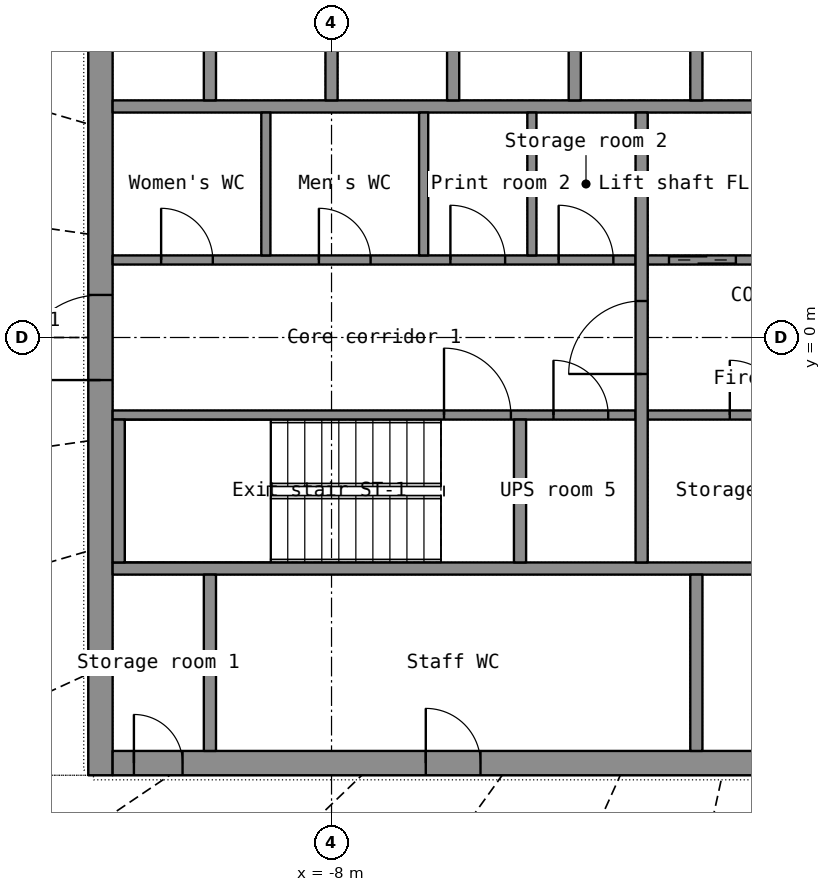
"""IFC4 building model, lengths in metres.
Left out: names, types, materials, properties, quantities, classifications, styles, units other than length and angle.
Written with IfcOpenShell. Run it as: python <this file> out.ifc"""

import sys

from ifc_helpers import new_model, si_unit, direction, frame, frame_2d, origin, place, context, subcontext, project, spatial, rectangle, extrude, element, fill, save


model = new_model("IFC4")
c1 = context("Model", 3, precision=1e-05, world=origin(), true_north=direction((0.0, 1.0)))
c2 = subcontext(c1, "Body", "Model", "MODEL_VIEW")
j1 = project(units=[si_unit("LENGTHUNIT", "METRE"), si_unit("PLANEANGLEUNIT", "RADIAN")], contexts=[c1])
p1 = place(None, origin())
s1 = spatial("IfcSite", under=j1, at=p1, CompositionType="ELEMENT")
p2 = place(p1, origin())
s2 = spatial("IfcBuilding", under=s1, at=p2, CompositionType="ELEMENT")
p3 = place(p2, frame((0.0, 0.0, 239.3)))
s3 = spatial("IfcBuildingStorey", under=s2, at=p3, CompositionType="ELEMENT", Elevation=239.3)
p4 = place(p3, frame((-11.8, -7.2, 0.0), z_axis=(0.0, 0.0, 1.0), x_axis=(0.0, 1.0, 0.0)))
e1 = element("IfcWall", 1, at=p4, inside=s3, PredefinedType="SHEAR", context=c2, shape_type="SweptSolid", body=[
    extrude(rectangle(XDim=14.4, YDim=0.4, at=frame_2d((7.2, 0.0))), origin(), (0.0, 0.0, 1.0), 3.3),
])
p5 = place(p4, frame((6.5, 0.0, 0.0)))
e2 = element("IfcOpeningElement", 2, at=p5, cuts=e1, PredefinedType="OPENING", context=c2, shape_type="SweptSolid", body=[
    extrude(rectangle(XDim=1.4, YDim=2.2, at=frame_2d((0.7, 1.1))), frame((0.0, 0.21, 0.0), z_axis=(0.0, -1.0, 0.0), x_axis=(1.0, 0.0, 0.0)), (0.0, 0.0, 1.0), 0.42),
])
p6 = place(p3, frame((-11.6, -7.0, 0.0), z_axis=(0.0, 0.0, 1.0), x_axis=(1.0, 0.0, 0.0)))
e3 = element("IfcWall", 3, at=p6, inside=s3, PredefinedType="SHEAR", context=c2, shape_type="SweptSolid", body=[
    extrude(rectangle(XDim=23.2, YDim=0.4, at=frame_2d((11.6, 0.0))), origin(), (0.0, 0.0, 1.0), 3.3),
])
p7 = place(p6, frame((20.05, 0.0, 0.0)))
e4 = element("IfcOpeningElement", 4, at=p7, cuts=e3, PredefinedType="OPENING", context=c2, shape_type="SweptSolid", body=[
    extrude(rectangle(XDim=1.1, YDim=2.2, at=frame_2d((0.55, 1.1))), frame((0.0, 0.21, 0.0), z_axis=(0.0, -1.0, 0.0), x_axis=(1.0, 0.0, 0.0)), (0.0, 0.0, 1.0), 0.42),
])
p8 = place(p6, frame((5.15, 0.0, 0.0)))
e5 = element("IfcOpeningElement", 5, at=p8, cuts=e3, PredefinedType="OPENING", context=c2, shape_type="SweptSolid", body=[
    extrude(rectangle(XDim=0.9, YDim=2.1, at=frame_2d((0.45, 1.05))), frame((0.0, 0.21, 0.0), z_axis=(0.0, -1.0, 0.0), x_axis=(1.0, 0.0, 0.0)), (0.0, 0.0, 1.0), 0.42),
])
p9 = place(p6, frame((11.15, 0.0, 0.0)))
e6 = element("IfcOpeningElement", 6, at=p9, cuts=e3, PredefinedType="OPENING", context=c2, shape_type="SweptSolid", body=[
    extrude(rectangle(XDim=0.9, YDim=2.1, at=frame_2d((0.45, 1.05))), frame((0.0, 0.21, 0.0), z_axis=(0.0, -1.0, 0.0), x_axis=(1.0, 0.0, 0.0)), (0.0, 0.0, 1.0), 0.42),
])
p10 = place(p6, frame((16.15, 0.0, 0.0)))
e7 = element("IfcOpeningElement", 7, at=p10, cuts=e3, PredefinedType="OPENING", context=c2, shape_type="SweptSolid", body=[
    extrude(rectangle(XDim=0.9, YDim=2.1, at=frame_2d((0.45, 1.05))), frame((0.0, 0.21, 0.0), z_axis=(0.0, -1.0, 0.0), x_axis=(1.0, 0.0, 0.0)), (0.0, 0.0, 1.0), 0.42),
])
p11 = place(p6, frame((0.35, 0.0, 0.0)))
e8 = element("IfcOpeningElement", 8, at=p11, cuts=e3, PredefinedType="OPENING", context=c2, shape_type="SweptSolid", body=[
    extrude(rectangle(XDim=0.8, YDim=2.05, at=frame_2d((0.4, 1.025))), frame((0.0, 0.21, 0.0), z_axis=(0.0, -1.0, 0.0), x_axis=(1.0, 0.0, 0.0)), (0.0, 0.0, 1.0), 0.42),
])
p12 = place(p6, frame((22.05, 0.0, 0.0)))
e9 = element("IfcOpeningElement", 9, at=p12, cuts=e3, PredefinedType="OPENING", context=c2, shape_type="SweptSolid", body=[
    extrude(rectangle(XDim=0.8, YDim=2.05, at=frame_2d((0.4, 1.025))), frame((0.0, 0.21, 0.0), z_axis=(0.0, -1.0, 0.0), x_axis=(1.0, 0.0, 0.0)), (0.0, 0.0, 1.0), 0.42),
])
for number, where, z_axis, x_axis in (
    (10, (-11.6, -3.8, 0.0), (0.0, 0.0, 1.0), (1.0, 0.0, 0.0)),
    (11, (-11.6, 3.8, 0.0), (0.0, 0.0, 1.0), (1.0, 0.0, 0.0)),
):
    element("IfcWall", number, at=place(p3, frame(where, z_axis=z_axis, x_axis=x_axis)), inside=s3, PredefinedType="SHEAR", context=c2, shape_type="SweptSolid", body=[
        extrude(rectangle(XDim=23.2, YDim=0.2, at=frame_2d((11.6, 0.0))), origin(), (0.0, 0.0, 1.0), 3.3),
    ])
p13 = place(p3, frame((-10.0, -6.8, 0.0), z_axis=(0.0, 0.0, 1.0), x_axis=(0.0, 1.0, 0.0)))
e12 = element("IfcWall", 12, at=p13, inside=s3, PredefinedType="SHEAR", context=c2, shape_type="SweptSolid", body=[
    extrude(rectangle(XDim=2.9, YDim=0.2, at=frame_2d((1.45, 0.0))), origin(), (0.0, 0.0, 1.0), 3.3),
])
p14 = place(p3, frame((-2.0, -6.8, 0.0), z_axis=(0.0, 0.0, 1.0), x_axis=(0.0, 1.0, 0.0)))
e13 = element("IfcWall", 13, at=p14, inside=s3, PredefinedType="PARTITIONING", context=c2, shape_type="SweptSolid", body=[
    extrude(rectangle(XDim=2.9, YDim=0.2, at=frame_2d((1.45, 0.0))), origin(), (0.0, 0.0, 1.0), 3.3),
])
for number, where, z_axis, x_axis in (
    (14, (-10.0, 3.9, 0.0), (0.0, 0.0, 1.0), (0.0, 1.0, 0.0)),
    (15, (-8.0, 3.9, 0.0), (0.0, 0.0, 1.0), (0.0, 1.0, 0.0)),
    (16, (-6.0, 3.9, 0.0), (0.0, 0.0, 1.0), (0.0, 1.0, 0.0)),
    (17, (-4.0, 3.9, 0.0), (0.0, 0.0, 1.0), (0.0, 1.0, 0.0)),
    (18, (-2.0, 3.9, 0.0), (0.0, 0.0, 1.0), (0.0, 1.0, 0.0)),
):
    element("IfcWall", number, at=place(p3, frame(where, z_axis=z_axis, x_axis=x_axis)), inside=s3, PredefinedType="SHEAR", context=c2, shape_type="SweptSolid", body=[
        extrude(rectangle(XDim=2.9, YDim=0.2, at=frame_2d((1.45, 0.0))), origin(), (0.0, 0.0, 1.0), 3.3),
    ])
p15 = place(p3, frame((-11.6, -1.275, 0.0), z_axis=(0.0, 0.0, 1.0), x_axis=(1.0, 0.0, 0.0)))
e19 = element("IfcWall", 19, at=p15, inside=s3, PredefinedType="SHEAR", context=c2, shape_type="SweptSolid", body=[
    extrude(rectangle(XDim=8.6, YDim=0.15, at=frame_2d((4.3, 0.0))), origin(), (0.0, 0.0, 1.0), 3.3),
])
p16 = place(p15, frame((5.45, 0.0, 0.0)))
e20 = element("IfcOpeningElement", 20, at=p16, cuts=e19, PredefinedType="OPENING", context=c2, shape_type="SweptSolid", body=[
    extrude(rectangle(XDim=1.1, YDim=2.15, at=frame_2d((0.55, 1.075))), frame((0.0, 0.085, 0.0), z_axis=(0.0, -1.0, 0.0), x_axis=(1.0, 0.0, 0.0)), (0.0, 0.0, 1.0), 0.17),
])
p17 = place(p15, frame((7.25, 0.0, 0.0)))
e21 = element("IfcOpeningElement", 21, at=p17, cuts=e19, PredefinedType="OPENING", context=c2, shape_type="SweptSolid", body=[
    extrude(rectangle(XDim=0.9, YDim=2.1, at=frame_2d((0.45, 1.05))), frame((0.0, 0.085, 0.0), z_axis=(0.0, -1.0, 0.0), x_axis=(1.0, 0.0, 0.0)), (0.0, 0.0, 1.0), 0.17),
])
p18 = place(p3, frame((-2.8, -1.275, 0.0), z_axis=(0.0, 0.0, 1.0), x_axis=(1.0, 0.0, 0.0)))
e22 = element("IfcWall", 22, at=p18, inside=s3, PredefinedType="SHEAR", context=c2, shape_type="SweptSolid", body=[
    extrude(rectangle(XDim=5.6, YDim=0.15, at=frame_2d((2.8, 0.0))), origin(), (0.0, 0.0, 1.0), 3.3),
])
p19 = place(p18, frame((4.15, 0.0, 0.0)))
e23 = element("IfcOpeningElement", 23, at=p19, cuts=e22, PredefinedType="OPENING", context=c2, shape_type="SweptSolid", body=[
    extrude(rectangle(XDim=1.1, YDim=2.2, at=frame_2d((0.55, 1.1))), frame((0.0, 0.085, 0.0), z_axis=(0.0, -1.0, 0.0), x_axis=(1.0, 0.0, 0.0)), (0.0, 0.0, 1.0), 0.17),
])
p20 = place(p18, frame((1.35, 0.0, 0.0)))
e24 = element("IfcOpeningElement", 24, at=p20, cuts=e22, PredefinedType="OPENING", context=c2, shape_type="SweptSolid", body=[
    extrude(rectangle(XDim=0.9, YDim=2.1, at=frame_2d((0.45, 1.05))), frame((0.0, 0.085, 0.0), z_axis=(0.0, -1.0, 0.0), x_axis=(1.0, 0.0, 0.0)), (0.0, 0.0, 1.0), 0.17),
])
p21 = place(p3, frame((-11.6, 1.275, 0.0), z_axis=(0.0, 0.0, 1.0), x_axis=(1.0, 0.0, 0.0)))
e25 = element("IfcWall", 25, at=p21, inside=s3, PredefinedType="PARTITIONING", context=c2, shape_type="SweptSolid", body=[
    extrude(rectangle(XDim=8.6, YDim=0.15, at=frame_2d((4.3, 0.0))), origin(), (0.0, 0.0, 1.0), 3.3),
])
p22 = place(p21, frame((0.798, 0.0, 0.0)))
e26 = element("IfcOpeningElement", 26, at=p22, cuts=e25, PredefinedType="OPENING", context=c2, shape_type="SweptSolid", body=[
    extrude(rectangle(XDim=0.85, YDim=2.1, at=frame_2d((0.425, 1.05))), frame((0.0, 0.085, 0.0), z_axis=(0.0, -1.0, 0.0), x_axis=(1.0, 0.0, 0.0)), (0.0, 0.0, 1.0), 0.17),
])
p23 = place(p21, frame((3.393, 0.0, 0.0)))
e27 = element("IfcOpeningElement", 27, at=p23, cuts=e25, PredefinedType="OPENING", context=c2, shape_type="SweptSolid", body=[
    extrude(rectangle(XDim=0.85, YDim=2.1, at=frame_2d((0.425, 1.05))), frame((0.0, 0.085, 0.0), z_axis=(0.0, -1.0, 0.0), x_axis=(1.0, 0.0, 0.0)), (0.0, 0.0, 1.0), 0.17),
])
p24 = place(p21, frame((5.555, 0.0, 0.0)))
e28 = element("IfcOpeningElement", 28, at=p24, cuts=e25, PredefinedType="OPENING", context=c2, shape_type="SweptSolid", body=[
    extrude(rectangle(XDim=0.9, YDim=2.1, at=frame_2d((0.45, 1.05))), frame((0.0, 0.085, 0.0), z_axis=(0.0, -1.0, 0.0), x_axis=(1.0, 0.0, 0.0)), (0.0, 0.0, 1.0), 0.17),
])
p25 = place(p21, frame((7.335, 0.0, 0.0)))
e29 = element("IfcOpeningElement", 29, at=p25, cuts=e25, PredefinedType="OPENING", context=c2, shape_type="SweptSolid", body=[
    extrude(rectangle(XDim=0.9, YDim=2.1, at=frame_2d((0.45, 1.05))), frame((0.0, 0.085, 0.0), z_axis=(0.0, -1.0, 0.0), x_axis=(1.0, 0.0, 0.0)), (0.0, 0.0, 1.0), 0.17),
])
p26 = place(p3, frame((-2.8, 1.275, 0.0), z_axis=(0.0, 0.0, 1.0), x_axis=(1.0, 0.0, 0.0)))
e30 = element("IfcWall", 30, at=p26, inside=s3, PredefinedType="SHEAR", context=c2, shape_type="SweptSolid", body=[
    extrude(rectangle(XDim=5.6, YDim=0.15, at=frame_2d((2.8, 0.0))), origin(), (0.0, 0.0, 1.0), 3.3),
])
p27 = place(p26, frame((0.35, 0.0, 0.0)))
e31 = element("IfcOpeningElement", 31, at=p27, cuts=e30, PredefinedType="OPENING", context=c2, shape_type="SweptSolid", body=[
    extrude(rectangle(XDim=1.1, YDim=2.2, at=frame_2d((0.55, 1.1))), frame((0.0, 0.085, 0.0), z_axis=(0.0, -1.0, 0.0), x_axis=(1.0, 0.0, 0.0)), (0.0, 0.0, 1.0), 0.17),
])
p28 = place(p26, frame((3.35, 0.0, 0.0)))
e32 = element("IfcOpeningElement", 32, at=p28, cuts=e30, PredefinedType="OPENING", context=c2, shape_type="SweptSolid", body=[
    extrude(rectangle(XDim=0.9, YDim=2.1, at=frame_2d((0.45, 1.05))), frame((0.0, 0.085, 0.0), z_axis=(0.0, -1.0, 0.0), x_axis=(1.0, 0.0, 0.0)), (0.0, 0.0, 1.0), 0.17),
])
p29 = place(p3, frame((-2.9, -3.7, 0.0), z_axis=(0.0, 0.0, 1.0), x_axis=(0.0, 1.0, 0.0)))
e33 = element("IfcWall", 33, at=p29, inside=s3, PredefinedType="SHEAR", context=c2, shape_type="SweptSolid", body=[
    extrude(rectangle(XDim=7.4, YDim=0.2, at=frame_2d((3.7, 0.0))), origin(), (0.0, 0.0, 1.0), 3.3),
])
p30 = place(p29, frame((3.1, 0.0, 0.0)))
e34 = element("IfcOpeningElement", 34, at=p30, cuts=e33, PredefinedType="OPENING", context=c2, shape_type="SweptSolid", body=[
    extrude(rectangle(XDim=1.2, YDim=2.2, at=frame_2d((0.6, 1.1))), frame((0.0, 0.11, 0.0), z_axis=(0.0, -1.0, 0.0), x_axis=(1.0, 0.0, 0.0)), (0.0, 0.0, 1.0), 0.22),
])
for number, where, z_axis, x_axis in (
    (35, (-11.5, -3.7, 0.0), (0.0, 0.0, 1.0), (0.0, 1.0, 0.0)),
    (36, (-4.9, -3.7, 0.0), (0.0, 0.0, 1.0), (0.0, 1.0, 0.0)),
):
    element("IfcWall", number, at=place(p3, frame(where, z_axis=z_axis, x_axis=x_axis)), inside=s3, PredefinedType="SHEAR", context=c2, shape_type="SweptSolid", body=[
        extrude(rectangle(XDim=2.35, YDim=0.2, at=frame_2d((1.175, 0.0))), origin(), (0.0, 0.0, 1.0), 3.3),
    ])
for number, where, z_axis, x_axis in (
    (37, (-9.08, 1.35, 0.0), (0.0, 0.0, 1.0), (0.0, 1.0, 0.0)),
    (38, (-6.485, 1.35, 0.0), (0.0, 0.0, 1.0), (0.0, 1.0, 0.0)),
    (39, (-4.705, 1.35, 0.0), (0.0, 0.0, 1.0), (0.0, 1.0, 0.0)),
):
    element("IfcWall", number, at=place(p3, frame(where, z_axis=z_axis, x_axis=x_axis)), inside=s3, PredefinedType="PARTITIONING", context=c2, shape_type="SweptSolid", body=[
        extrude(rectangle(XDim=2.35, YDim=0.15, at=frame_2d((1.175, 0.0))), origin(), (0.0, 0.0, 1.0), 3.3),
    ])
p31 = place(p8, origin())
e40 = element("IfcDoor", 40, at=p31, inside=s3, OperationType="SINGLE_SWING_LEFT", PredefinedType="DOOR", context=c2, shape_type="SweptSolid", body=[
    extrude(rectangle(XDim=0.9, YDim=2.1, at=frame_2d((0.45, 1.05))), frame((0.0, 0.025, 0.0), z_axis=(0.0, -1.0, 0.0), x_axis=(1.0, 0.0, 0.0)), (0.0, 0.0, 1.0), 0.05),
])
fill(e5, e40)
p32 = place(p11, origin())
e41 = element("IfcDoor", 41, at=p32, inside=s3, OperationType="SINGLE_SWING_LEFT", PredefinedType="DOOR", context=c2, shape_type="SweptSolid", body=[
    extrude(rectangle(XDim=0.8, YDim=2.05, at=frame_2d((0.4, 1.025))), frame((0.0, 0.025, 0.0), z_axis=(0.0, -1.0, 0.0), x_axis=(1.0, 0.0, 0.0)), (0.0, 0.0, 1.0), 0.05),
])
fill(e8, e41)
p33 = place(p5, origin())
e42 = element("IfcDoor", 42, at=p33, inside=s3, OperationType="DOUBLE_DOOR_SINGLE_SWING", PredefinedType="DOOR", context=c2, shape_type="SweptSolid", body=[
    extrude(rectangle(XDim=1.4, YDim=2.2, at=frame_2d((0.7, 1.1))), frame((0.0, 0.025, 0.0), z_axis=(0.0, -1.0, 0.0), x_axis=(1.0, 0.0, 0.0)), (0.0, 0.0, 1.0), 0.05),
])
fill(e2, e42)
p34 = place(p30, origin())
e43 = element("IfcDoor", 43, at=p34, inside=s3, OperationType="SINGLE_SWING_LEFT", PredefinedType="DOOR", context=c2, shape_type="SweptSolid", body=[
    extrude(rectangle(XDim=1.2, YDim=2.2, at=frame_2d((0.6, 1.1))), frame((0.0, 0.025, 0.0), z_axis=(0.0, -1.0, 0.0), x_axis=(1.0, 0.0, 0.0)), (0.0, 0.0, 1.0), 0.05),
])
fill(e34, e43)
p35 = place(p27, origin())
e44 = element("IfcDoor", 44, at=p35, inside=s3, OperationType="DOUBLE_DOOR_SLIDING", PredefinedType="DOOR", context=c2, shape_type="SweptSolid", body=[
    extrude(rectangle(XDim=1.1, YDim=2.2, at=frame_2d((0.55, 1.1))), frame((0.0, 0.025, 0.0), z_axis=(0.0, -1.0, 0.0), x_axis=(1.0, 0.0, 0.0)), (0.0, 0.0, 1.0), 0.05),
])
fill(e31, e44)
p36 = place(p16, origin())
e45 = element("IfcDoor", 45, at=p36, inside=s3, OperationType="SINGLE_SWING_LEFT", PredefinedType="DOOR", context=c2, shape_type="SweptSolid", body=[
    extrude(rectangle(XDim=1.1, YDim=2.15, at=frame_2d((0.55, 1.075))), frame((0.0, 0.025, 0.0), z_axis=(0.0, -1.0, 0.0), x_axis=(1.0, 0.0, 0.0)), (0.0, 0.0, 1.0), 0.05),
])
fill(e20, e45)
p37 = place(p22, origin())
e46 = element("IfcDoor", 46, at=p37, inside=s3, OperationType="SINGLE_SWING_LEFT", PredefinedType="DOOR", context=c2, shape_type="SweptSolid", body=[
    extrude(rectangle(XDim=0.85, YDim=2.1, at=frame_2d((0.425, 1.05))), frame((0.0, 0.025, 0.0), z_axis=(0.0, -1.0, 0.0), x_axis=(1.0, 0.0, 0.0)), (0.0, 0.0, 1.0), 0.05),
])
fill(e26, e46)
p38 = place(p23, origin())
e47 = element("IfcDoor", 47, at=p38, inside=s3, OperationType="SINGLE_SWING_LEFT", PredefinedType="DOOR", context=c2, shape_type="SweptSolid", body=[
    extrude(rectangle(XDim=0.85, YDim=2.1, at=frame_2d((0.425, 1.05))), frame((0.0, 0.025, 0.0), z_axis=(0.0, -1.0, 0.0), x_axis=(1.0, 0.0, 0.0)), (0.0, 0.0, 1.0), 0.05),
])
fill(e27, e47)
p39 = place(p24, origin())
e48 = element("IfcDoor", 48, at=p39, inside=s3, OperationType="SINGLE_SWING_LEFT", PredefinedType="DOOR", context=c2, shape_type="SweptSolid", body=[
    extrude(rectangle(XDim=0.9, YDim=2.1, at=frame_2d((0.45, 1.05))), frame((0.0, 0.025, 0.0), z_axis=(0.0, -1.0, 0.0), x_axis=(1.0, 0.0, 0.0)), (0.0, 0.0, 1.0), 0.05),
])
fill(e28, e48)
p40 = place(p25, origin())
e49 = element("IfcDoor", 49, at=p40, inside=s3, OperationType="SINGLE_SWING_LEFT", PredefinedType="DOOR", context=c2, shape_type="SweptSolid", body=[
    extrude(rectangle(XDim=0.9, YDim=2.1, at=frame_2d((0.45, 1.05))), frame((0.0, 0.025, 0.0), z_axis=(0.0, -1.0, 0.0), x_axis=(1.0, 0.0, 0.0)), (0.0, 0.0, 1.0), 0.05),
])
fill(e29, e49)
p41 = place(p20, origin())
e50 = element("IfcDoor", 50, at=p41, inside=s3, OperationType="SINGLE_SWING_LEFT", PredefinedType="DOOR", context=c2, shape_type="SweptSolid", body=[
    extrude(rectangle(XDim=0.9, YDim=2.1, at=frame_2d((0.45, 1.05))), frame((0.0, 0.025, 0.0), z_axis=(0.0, -1.0, 0.0), x_axis=(1.0, 0.0, 0.0)), (0.0, 0.0, 1.0), 0.05),
])
fill(e24, e50)
p42 = place(p17, origin())
e51 = element("IfcDoor", 51, at=p42, inside=s3, OperationType="SINGLE_SWING_LEFT", PredefinedType="DOOR", context=c2, shape_type="SweptSolid", body=[
    extrude(rectangle(XDim=0.9, YDim=2.1, at=frame_2d((0.45, 1.05))), frame((0.0, 0.025, 0.0), z_axis=(0.0, -1.0, 0.0), x_axis=(1.0, 0.0, 0.0)), (0.0, 0.0, 1.0), 0.05),
])
fill(e21, e51)
save(model, sys.argv[1])
